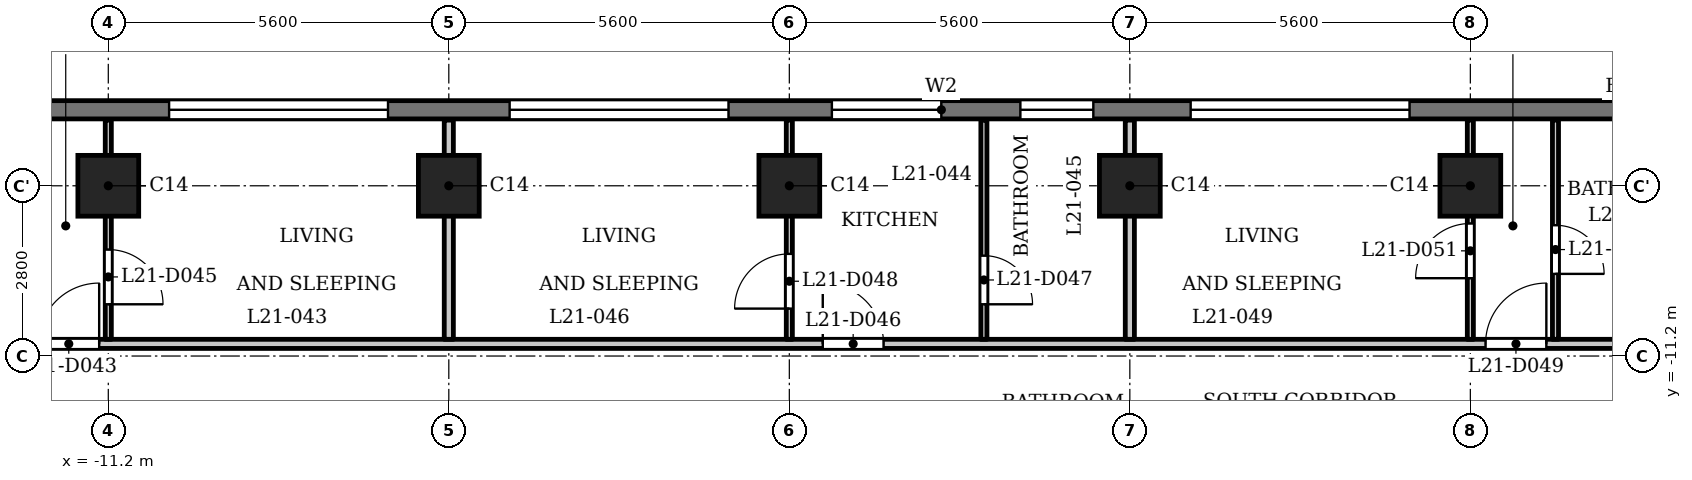
"""IFC4 building model, lengths in metres.
Left out: names, types, materials, properties, quantities, classifications, styles, units other than length and angle.
Written with IfcOpenShell. Run it as: python <this file> out.ifc"""

import sys

from ifc_helpers import new_model, si_unit, direction, frame, frame_2d, origin, origin_2d, place, context, subcontext, project, spatial, rectangle, extrude, element, fill, save


model = new_model("IFC4")
c1 = context("Model", 3, precision=1e-05, world=origin(), true_north=direction((0.0, 1.0)))
c2 = subcontext(c1, "Body", "Model", "MODEL_VIEW")
j1 = project(units=[si_unit("LENGTHUNIT", "METRE"), si_unit("PLANEANGLEUNIT", "RADIAN")], contexts=[c1])
p1 = place(None, origin())
s1 = spatial("IfcSite", under=j1, at=p1, CompositionType="ELEMENT")
p2 = place(p1, origin())
s2 = spatial("IfcBuilding", under=s1, at=p2, CompositionType="ELEMENT")
p3 = place(p2, frame((0.0, 0.0, 86.8)))
s3 = spatial("IfcBuildingStorey", under=s2, at=p3, CompositionType="ELEMENT", Elevation=86.8)
for number, where, z_axis, x_axis in (
    (1, (-11.2, -8.4, 0.0), (0.0, 0.0, 1.0), (1.0, 0.0, 0.0)),
    (2, (-5.6, -8.4, 0.0), (0.0, 0.0, 1.0), (1.0, 0.0, 0.0)),
    (3, (0.0, -8.4, 0.0), (0.0, 0.0, 1.0), (1.0, 0.0, 0.0)),
    (4, (5.6, -8.4, 0.0), (0.0, 0.0, 1.0), (1.0, 0.0, 0.0)),
    (5, (11.2, -8.4, 0.0), (0.0, 0.0, 1.0), (1.0, 0.0, 0.0)),
):
    element("IfcColumn", number, at=place(p3, frame(where, z_axis=z_axis, x_axis=x_axis)), inside=s3, PredefinedType="COLUMN", context=c2, shape_type="SweptSolid", body=[
        extrude(rectangle(XDim=1.0, YDim=1.0, at=origin_2d()), origin(), (0.0, 0.0, 1.0), 3.5),
    ])
p4 = place(p3, frame((13.8, -7.15, 0.0), z_axis=(0.0, 0.0, 1.0), x_axis=(-1.0, 0.0, 0.0)))
e6 = element("IfcWall", 6, at=p4, inside=s3, PredefinedType="SOLIDWALL", context=c2, shape_type="SweptSolid", body=[
    extrude(rectangle(XDim=27.6, YDim=0.3, at=frame_2d((13.8, 0.0))), origin(), (0.0, 0.0, 1.0), 3.2),
])
p5 = place(p4, frame((3.6, 0.0, 1.2)))
e7 = element("IfcOpeningElement", 7, at=p5, cuts=e6, PredefinedType="OPENING", context=c2, shape_type="SweptSolid", body=[
    extrude(rectangle(XDim=3.6, YDim=0.95, at=frame_2d((1.8, 0.475))), frame((0.0, 0.16, 0.0), z_axis=(0.0, -1.0, 0.0), x_axis=(1.0, 0.0, 0.0)), (0.0, 0.0, 1.0), 0.32),
])
p6 = place(p4, frame((8.8, 0.0, 0.6)))
e8 = element("IfcOpeningElement", 8, at=p6, cuts=e6, PredefinedType="OPENING", context=c2, shape_type="SweptSolid", body=[
    extrude(rectangle(XDim=1.2, YDim=1.55, at=frame_2d((0.6, 0.775))), frame((0.0, 0.16, 0.0), z_axis=(0.0, -1.0, 0.0), x_axis=(1.0, 0.0, 0.0)), (0.0, 0.0, 1.0), 0.32),
])
p7 = place(p4, frame((11.3, 0.0, 0.9)))
e9 = element("IfcOpeningElement", 9, at=p7, cuts=e6, PredefinedType="OPENING", context=c2, shape_type="SweptSolid", body=[
    extrude(rectangle(XDim=1.8, YDim=1.25, at=frame_2d((0.9, 0.625))), frame((0.0, 0.16, 0.0), z_axis=(0.0, -1.0, 0.0), x_axis=(1.0, 0.0, 0.0)), (0.0, 0.0, 1.0), 0.32),
])
p8 = place(p4, frame((14.8, 0.0, 1.2)))
e10 = element("IfcOpeningElement", 10, at=p8, cuts=e6, PredefinedType="OPENING", context=c2, shape_type="SweptSolid", body=[
    extrude(rectangle(XDim=3.6, YDim=0.95, at=frame_2d((1.8, 0.475))), frame((0.0, 0.16, 0.0), z_axis=(0.0, -1.0, 0.0), x_axis=(1.0, 0.0, 0.0)), (0.0, 0.0, 1.0), 0.32),
])
p9 = place(p4, frame((20.4, 0.0, 1.2)))
e11 = element("IfcOpeningElement", 11, at=p9, cuts=e6, PredefinedType="OPENING", context=c2, shape_type="SweptSolid", body=[
    extrude(rectangle(XDim=3.6, YDim=0.95, at=frame_2d((1.8, 0.475))), frame((0.0, 0.16, 0.0), z_axis=(0.0, -1.0, 0.0), x_axis=(1.0, 0.0, 0.0)), (0.0, 0.0, 1.0), 0.32),
])
p10 = place(p3, frame((-14.925, -11.0, 0.0), z_axis=(0.0, 0.0, 1.0), x_axis=(1.0, 0.0, 0.0)))
e12 = element("IfcWall", 12, at=p10, inside=s3, PredefinedType="PARTITIONING", context=c2, shape_type="SweptSolid", body=[
    extrude(rectangle(XDim=29.85, YDim=0.15, at=frame_2d((14.925, 0.0))), origin(), (0.0, 0.0, 1.0), 3.2),
])
p11 = place(p10, frame((2.575, 0.0, 0.0)))
e13 = element("IfcOpeningElement", 13, at=p11, cuts=e12, PredefinedType="OPENING", context=c2, shape_type="SweptSolid", body=[
    extrude(rectangle(XDim=1.0, YDim=2.1, at=frame_2d((0.5, 1.05))), frame((0.0, 0.085, 0.0), z_axis=(0.0, -1.0, 0.0), x_axis=(1.0, 0.0, 0.0)), (0.0, 0.0, 1.0), 0.17),
])
p12 = place(p10, frame((15.475, 0.0, 0.0)))
e14 = element("IfcOpeningElement", 14, at=p12, cuts=e12, PredefinedType="OPENING", context=c2, shape_type="SweptSolid", body=[
    extrude(rectangle(XDim=1.0, YDim=2.1, at=frame_2d((0.5, 1.05))), frame((0.0, 0.085, 0.0), z_axis=(0.0, -1.0, 0.0), x_axis=(1.0, 0.0, 0.0)), (0.0, 0.0, 1.0), 0.17),
])
p13 = place(p10, frame((26.375, 0.0, 0.0)))
e15 = element("IfcOpeningElement", 15, at=p13, cuts=e12, PredefinedType="OPENING", context=c2, shape_type="SweptSolid", body=[
    extrude(rectangle(XDim=1.0, YDim=2.1, at=frame_2d((0.5, 1.05))), frame((0.0, 0.085, 0.0), z_axis=(0.0, -1.0, 0.0), x_axis=(1.0, 0.0, 0.0)), (0.0, 0.0, 1.0), 0.17),
])
p14 = place(p3, frame((-11.2, -10.925, 0.0), z_axis=(0.0, 0.0, 1.0), x_axis=(0.0, 1.0, 0.0)))
e16 = element("IfcWall", 16, at=p14, inside=s3, PredefinedType="PARTITIONING", context=c2, shape_type="SweptSolid", body=[
    extrude(rectangle(XDim=3.605, YDim=0.1, at=frame_2d((1.802, 0.0))), origin(), (0.0, 0.0, 1.0), 3.2),
])
p15 = place(p14, frame((0.576, 0.0, 0.0)))
e17 = element("IfcOpeningElement", 17, at=p15, cuts=e16, PredefinedType="OPENING", context=c2, shape_type="SweptSolid", body=[
    extrude(rectangle(XDim=0.9, YDim=2.1, at=frame_2d((0.45, 1.05))), frame((0.0, 0.06, 0.0), z_axis=(0.0, -1.0, 0.0), x_axis=(1.0, 0.0, 0.0)), (0.0, 0.0, 1.0), 0.12),
])
p16 = place(p3, frame((-5.6, -10.925, 0.0), z_axis=(0.0, 0.0, 1.0), x_axis=(0.0, 1.0, 0.0)))
e18 = element("IfcWall", 18, at=p16, inside=s3, PredefinedType="PARTITIONING", context=c2, shape_type="SweptSolid", body=[
    extrude(rectangle(XDim=3.605, YDim=0.15, at=frame_2d((1.802, 0.0))), origin(), (0.0, 0.0, 1.0), 3.2),
])
p17 = place(p3, frame((0.0, -10.925, 0.0), z_axis=(0.0, 0.0, 1.0), x_axis=(0.0, 1.0, 0.0)))
e19 = element("IfcWall", 19, at=p17, inside=s3, PredefinedType="PARTITIONING", context=c2, shape_type="SweptSolid", body=[
    extrude(rectangle(XDim=3.605, YDim=0.1, at=frame_2d((1.802, 0.0))), origin(), (0.0, 0.0, 1.0), 3.2),
])
p18 = place(p17, frame((0.505, 0.0, 0.0)))
e20 = element("IfcOpeningElement", 20, at=p18, cuts=e19, PredefinedType="OPENING", context=c2, shape_type="SweptSolid", body=[
    extrude(rectangle(XDim=0.9, YDim=2.1, at=frame_2d((0.45, 1.05))), frame((0.0, 0.06, 0.0), z_axis=(0.0, -1.0, 0.0), x_axis=(1.0, 0.0, 0.0)), (0.0, 0.0, 1.0), 0.12),
])
p19 = place(p3, frame((3.2, -10.925, 0.0), z_axis=(0.0, 0.0, 1.0), x_axis=(0.0, 1.0, 0.0)))
e21 = element("IfcWall", 21, at=p19, inside=s3, PredefinedType="PARTITIONING", context=c2, shape_type="SweptSolid", body=[
    extrude(rectangle(XDim=3.605, YDim=0.1, at=frame_2d((1.802, 0.0))), origin(), (0.0, 0.0, 1.0), 3.2),
])
p20 = place(p19, frame((0.576, 0.0, 0.0)))
e22 = element("IfcOpeningElement", 22, at=p20, cuts=e21, PredefinedType="OPENING", context=c2, shape_type="SweptSolid", body=[
    extrude(rectangle(XDim=0.8, YDim=2.1, at=frame_2d((0.4, 1.05))), frame((0.0, 0.06, 0.0), z_axis=(0.0, -1.0, 0.0), x_axis=(1.0, 0.0, 0.0)), (0.0, 0.0, 1.0), 0.12),
])
p21 = place(p3, frame((5.6, -10.925, 0.0), z_axis=(0.0, 0.0, 1.0), x_axis=(0.0, 1.0, 0.0)))
e23 = element("IfcWall", 23, at=p21, inside=s3, PredefinedType="PARTITIONING", context=c2, shape_type="SweptSolid", body=[
    extrude(rectangle(XDim=3.605, YDim=0.15, at=frame_2d((1.802, 0.0))), origin(), (0.0, 0.0, 1.0), 3.2),
])
p22 = place(p3, frame((11.2, -10.925, 0.0), z_axis=(0.0, 0.0, 1.0), x_axis=(0.0, 1.0, 0.0)))
e24 = element("IfcWall", 24, at=p22, inside=s3, PredefinedType="PARTITIONING", context=c2, shape_type="SweptSolid", body=[
    extrude(rectangle(XDim=3.605, YDim=0.1, at=frame_2d((1.802, 0.0))), origin(), (0.0, 0.0, 1.0), 3.2),
])
p23 = place(p22, frame((1.005, 0.0, 0.0)))
e25 = element("IfcOpeningElement", 25, at=p23, cuts=e24, PredefinedType="OPENING", context=c2, shape_type="SweptSolid", body=[
    extrude(rectangle(XDim=0.9, YDim=2.1, at=frame_2d((0.45, 1.05))), frame((0.0, 0.06, 0.0), z_axis=(0.0, -1.0, 0.0), x_axis=(1.0, 0.0, 0.0)), (0.0, 0.0, 1.0), 0.12),
])
p24 = place(p3, frame((12.6, -10.925, 0.0), z_axis=(0.0, 0.0, 1.0), x_axis=(0.0, 1.0, 0.0)))
e26 = element("IfcWall", 26, at=p24, inside=s3, PredefinedType="PARTITIONING", context=c2, shape_type="SweptSolid", body=[
    extrude(rectangle(XDim=3.605, YDim=0.1, at=frame_2d((1.802, 0.0))), origin(), (0.0, 0.0, 1.0), 3.2),
])
p25 = place(p24, frame((1.076, 0.0, 0.0)))
e27 = element("IfcOpeningElement", 27, at=p25, cuts=e26, PredefinedType="OPENING", context=c2, shape_type="SweptSolid", body=[
    extrude(rectangle(XDim=0.8, YDim=2.1, at=frame_2d((0.4, 1.05))), frame((0.0, 0.06, 0.0), z_axis=(0.0, -1.0, 0.0), x_axis=(1.0, 0.0, 0.0)), (0.0, 0.0, 1.0), 0.12),
])
p26 = place(p11, origin())
e28 = element("IfcDoor", 28, at=p26, inside=s3, OperationType="SINGLE_SWING_LEFT", PredefinedType="DOOR", context=c2, shape_type="SweptSolid", body=[
    extrude(rectangle(XDim=1.0, YDim=2.1, at=frame_2d((0.5, 1.05))), frame((0.0, 0.025, 0.0), z_axis=(0.0, -1.0, 0.0), x_axis=(1.0, 0.0, 0.0)), (0.0, 0.0, 1.0), 0.05),
])
fill(e13, e28)
p27 = place(p15, origin())
e29 = element("IfcDoor", 29, at=p27, inside=s3, OperationType="SINGLE_SWING_LEFT", PredefinedType="DOOR", context=c2, shape_type="SweptSolid", body=[
    extrude(rectangle(XDim=0.9, YDim=2.1, at=frame_2d((0.45, 1.05))), frame((0.0, 0.025, 0.0), z_axis=(0.0, -1.0, 0.0), x_axis=(1.0, 0.0, 0.0)), (0.0, 0.0, 1.0), 0.05),
])
fill(e17, e29)
p28 = place(p12, origin())
e30 = element("IfcDoor", 30, at=p28, inside=s3, OperationType="SINGLE_SWING_RIGHT", PredefinedType="DOOR", context=c2, shape_type="SweptSolid", body=[
    extrude(rectangle(XDim=1.0, YDim=2.1, at=frame_2d((0.5, 1.05))), frame((0.0, 0.025, 0.0), z_axis=(0.0, -1.0, 0.0), x_axis=(1.0, 0.0, 0.0)), (0.0, 0.0, 1.0), 0.05),
])
fill(e14, e30)
p29 = place(p20, origin())
e31 = element("IfcDoor", 31, at=p29, inside=s3, OperationType="SINGLE_SWING_LEFT", PredefinedType="DOOR", context=c2, shape_type="SweptSolid", body=[
    extrude(rectangle(XDim=0.8, YDim=2.1, at=frame_2d((0.4, 1.05))), frame((0.0, 0.025, 0.0), z_axis=(0.0, -1.0, 0.0), x_axis=(1.0, 0.0, 0.0)), (0.0, 0.0, 1.0), 0.05),
])
fill(e22, e31)
p30 = place(p18, origin())
e32 = element("IfcDoor", 32, at=p30, inside=s3, OperationType="SINGLE_SWING_RIGHT", PredefinedType="DOOR", context=c2, shape_type="SweptSolid", body=[
    extrude(rectangle(XDim=0.9, YDim=2.1, at=frame_2d((0.45, 1.05))), frame((0.0, 0.025, 0.0), z_axis=(0.0, -1.0, 0.0), x_axis=(1.0, 0.0, 0.0)), (0.0, 0.0, 1.0), 0.05),
])
fill(e20, e32)
p31 = place(p13, origin())
e33 = element("IfcDoor", 33, at=p31, inside=s3, OperationType="SINGLE_SWING_LEFT", PredefinedType="DOOR", context=c2, shape_type="SweptSolid", body=[
    extrude(rectangle(XDim=1.0, YDim=2.1, at=frame_2d((0.5, 1.05))), frame((0.0, 0.025, 0.0), z_axis=(0.0, -1.0, 0.0), x_axis=(1.0, 0.0, 0.0)), (0.0, 0.0, 1.0), 0.05),
])
fill(e15, e33)
p32 = place(p25, origin())
e34 = element("IfcDoor", 34, at=p32, inside=s3, OperationType="SINGLE_SWING_LEFT", PredefinedType="DOOR", context=c2, shape_type="SweptSolid", body=[
    extrude(rectangle(XDim=0.8, YDim=2.1, at=frame_2d((0.4, 1.05))), frame((0.0, 0.025, 0.0), z_axis=(0.0, -1.0, 0.0), x_axis=(1.0, 0.0, 0.0)), (0.0, 0.0, 1.0), 0.05),
])
fill(e27, e34)
p33 = place(p23, origin())
e35 = element("IfcDoor", 35, at=p33, inside=s3, OperationType="SINGLE_SWING_RIGHT", PredefinedType="DOOR", context=c2, shape_type="SweptSolid", body=[
    extrude(rectangle(XDim=0.9, YDim=2.1, at=frame_2d((0.45, 1.05))), frame((0.0, 0.025, 0.0), z_axis=(0.0, -1.0, 0.0), x_axis=(1.0, 0.0, 0.0)), (0.0, 0.0, 1.0), 0.05),
])
fill(e25, e35)
p34 = place(p5, origin())
e36 = element("IfcWindow", 36, at=p34, inside=s3, PartitioningType="SINGLE_PANEL", PredefinedType="WINDOW", context=c2, shape_type="SweptSolid", body=[
    extrude(rectangle(XDim=3.6, YDim=0.95, at=frame_2d((1.8, 0.475))), frame((0.0, 0.03, 0.0), z_axis=(0.0, -1.0, 0.0), x_axis=(1.0, 0.0, 0.0)), (0.0, 0.0, 1.0), 0.06),
])
fill(e7, e36)
p35 = place(p6, origin())
e37 = element("IfcWindow", 37, at=p35, inside=s3, PartitioningType="SINGLE_PANEL", PredefinedType="WINDOW", context=c2, shape_type="SweptSolid", body=[
    extrude(rectangle(XDim=1.2, YDim=1.55, at=frame_2d((0.6, 0.775))), frame((0.0, 0.03, 0.0), z_axis=(0.0, -1.0, 0.0), x_axis=(1.0, 0.0, 0.0)), (0.0, 0.0, 1.0), 0.06),
])
fill(e8, e37)
p36 = place(p7, origin())
e38 = element("IfcWindow", 38, at=p36, inside=s3, PartitioningType="SINGLE_PANEL", PredefinedType="WINDOW", context=c2, shape_type="SweptSolid", body=[
    extrude(rectangle(XDim=1.8, YDim=1.25, at=frame_2d((0.9, 0.625))), frame((0.0, 0.03, 0.0), z_axis=(0.0, -1.0, 0.0), x_axis=(1.0, 0.0, 0.0)), (0.0, 0.0, 1.0), 0.06),
])
fill(e9, e38)
p37 = place(p8, origin())
e39 = element("IfcWindow", 39, at=p37, inside=s3, PartitioningType="SINGLE_PANEL", PredefinedType="WINDOW", context=c2, shape_type="SweptSolid", body=[
    extrude(rectangle(XDim=3.6, YDim=0.95, at=frame_2d((1.8, 0.475))), frame((0.0, 0.03, 0.0), z_axis=(0.0, -1.0, 0.0), x_axis=(1.0, 0.0, 0.0)), (0.0, 0.0, 1.0), 0.06),
])
fill(e10, e39)
p38 = place(p9, origin())
e40 = element("IfcWindow", 40, at=p38, inside=s3, PartitioningType="SINGLE_PANEL", PredefinedType="WINDOW", context=c2, shape_type="SweptSolid", body=[
    extrude(rectangle(XDim=3.6, YDim=0.95, at=frame_2d((1.8, 0.475))), frame((0.0, 0.03, 0.0), z_axis=(0.0, -1.0, 0.0), x_axis=(1.0, 0.0, 0.0)), (0.0, 0.0, 1.0), 0.06),
])
fill(e11, e40)
save(model, sys.argv[1])
